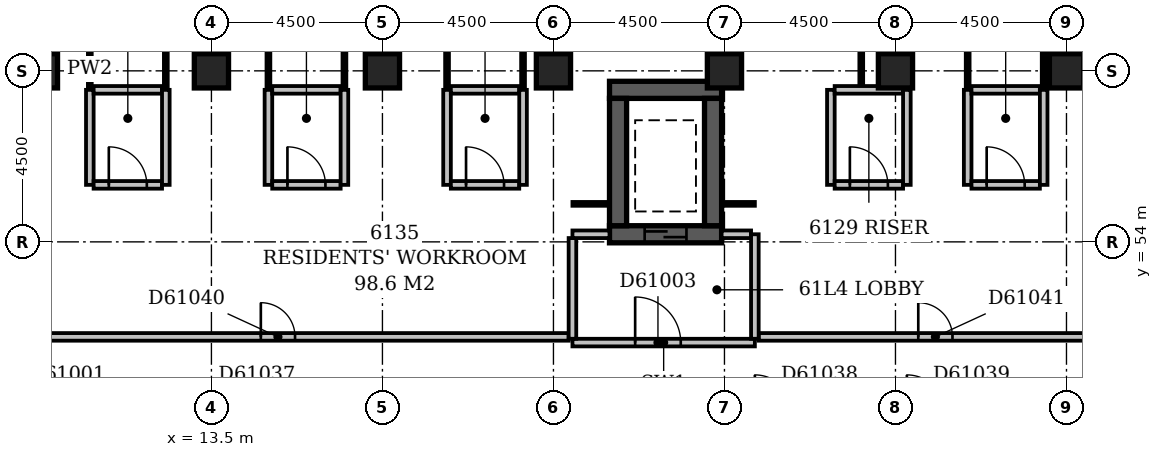
"""IFC4 building model, lengths in metres.
Left out: names, types, materials, properties, quantities, classifications, styles, units other than length and angle.
Written with IfcOpenShell. Run it as: python <this file> out.ifc"""

import sys

from ifc_helpers import new_model, si_unit, direction, frame, frame_2d, origin, origin_2d, place, context, subcontext, project, spatial, rectangle, extrude, element, fill, save


model = new_model("IFC4")
c1 = context("Model", 3, precision=1e-05, world=origin(), true_north=direction((0.0, 1.0)))
c2 = subcontext(c1, "Body", "Model", "MODEL_VIEW")
j1 = project(units=[si_unit("LENGTHUNIT", "METRE"), si_unit("PLANEANGLEUNIT", "RADIAN")], contexts=[c1])
p1 = place(None, origin())
s1 = spatial("IfcSite", under=j1, at=p1, CompositionType="ELEMENT")
p2 = place(p1, origin())
s2 = spatial("IfcBuilding", under=s1, at=p2, CompositionType="ELEMENT")
p3 = place(p2, frame((0.0, 0.0, 236.6)))
s3 = spatial("IfcBuildingStorey", under=s2, at=p3, CompositionType="ELEMENT", Elevation=236.6)
p4 = place(p3, frame((23.975, 54.2, -0.3), z_axis=(0.0, 0.0, 1.0), x_axis=(1.0, 0.0, 0.0)))
e1 = element("IfcWall", 1, at=p4, inside=s3, PredefinedType="SHEAR", context=c2, shape_type="SweptSolid", body=[
    extrude(rectangle(XDim=2.95, YDim=0.45, at=frame_2d((1.475, 0.0))), origin(), (0.0, 0.0, 1.0), 3.6),
])
p5 = place(p4, frame((0.925, 0.0, 0.3)))
e2 = element("IfcOpeningElement", 2, at=p5, cuts=e1, PredefinedType="OPENING", context=c2, shape_type="SweptSolid", body=[
    extrude(rectangle(XDim=1.1, YDim=2.1, at=frame_2d((0.55, 1.05))), frame((0.0, 0.237, 0.0), z_axis=(0.0, -1.0, 0.0), x_axis=(1.0, 0.0, 0.0)), (0.0, 0.0, 1.0), 0.474),
])
p6 = place(p3, frame((23.975, 58.0, -0.3), z_axis=(0.0, 0.0, 1.0), x_axis=(1.0, 0.0, 0.0)))
e3 = element("IfcWall", 3, at=p6, inside=s3, PredefinedType="SHEAR", context=c2, shape_type="SweptSolid", body=[
    extrude(rectangle(XDim=2.95, YDim=0.45, at=frame_2d((1.475, 0.0))), origin(), (0.0, 0.0, 1.0), 3.6),
])
for number, where, z_axis, x_axis in (
    (4, (24.2, 54.425, -0.3), (0.0, 0.0, 1.0), (0.0, 1.0, 0.0)),
    (5, (26.7, 54.425, -0.3), (0.0, 0.0, 1.0), (0.0, 1.0, 0.0)),
):
    element("IfcWall", number, at=place(p3, frame(where, z_axis=z_axis, x_axis=x_axis)), inside=s3, PredefinedType="SHEAR", context=c2, shape_type="SweptSolid", body=[
        extrude(rectangle(XDim=3.35, YDim=0.45, at=frame_2d((1.675, 0.0))), origin(), (0.0, 0.0, 1.0), 3.6),
    ])
for number, where, z_axis, x_axis in (
    (6, (9.0, 58.5, -0.3), (0.0, 0.0, 1.0), (1.0, 0.0, 0.0)),
    (7, (13.5, 58.5, -0.3), (0.0, 0.0, 1.0), (1.0, 0.0, 0.0)),
    (8, (18.0, 58.5, -0.3), (0.0, 0.0, 1.0), (1.0, 0.0, 0.0)),
    (9, (22.5, 58.5, -0.3), (0.0, 0.0, 1.0), (1.0, 0.0, 0.0)),
    (10, (27.0, 58.5, -0.3), (0.0, 0.0, 1.0), (1.0, 0.0, 0.0)),
    (11, (31.5, 58.5, -0.3), (0.0, 0.0, 1.0), (1.0, 0.0, 0.0)),
    (12, (36.0, 58.5, -0.3), (0.0, 0.0, 1.0), (1.0, 0.0, 0.0)),
):
    element("IfcColumn", number, at=place(p3, frame(where, z_axis=z_axis, x_axis=x_axis)), inside=s3, PredefinedType="COLUMN", context=c2, shape_type="SweptSolid", body=[
        extrude(rectangle(XDim=0.9, YDim=0.9, at=origin_2d()), origin(), (0.0, 0.0, 1.0), 3.6),
    ])
p7 = place(p3, frame((23.0, 51.35, 0.0), z_axis=(0.0, 0.0, 1.0), x_axis=(1.0, 0.0, 0.0)))
e13 = element("IfcWall", 13, at=p7, inside=s3, PredefinedType="PARTITIONING", context=c2, shape_type="SweptSolid", body=[
    extrude(rectangle(XDim=4.8, YDim=0.2, at=frame_2d((2.4, 0.0))), origin(), (0.0, 0.0, 1.0), 3.3),
])
p8 = place(p7, frame((1.65, 0.0, 0.0)))
e14 = element("IfcOpeningElement", 14, at=p8, cuts=e13, PredefinedType="OPENING", context=c2, shape_type="SweptSolid", body=[
    extrude(rectangle(XDim=1.2, YDim=2.1, at=frame_2d((0.6, 1.05))), frame((0.0, 0.112, 0.0), z_axis=(0.0, -1.0, 0.0), x_axis=(1.0, 0.0, 0.0)), (0.0, 0.0, 1.0), 0.224),
])
p9 = place(p3, frame((27.8, 51.45, 0.0), z_axis=(0.0, 0.0, 1.0), x_axis=(0.0, 1.0, 0.0)))
e15 = element("IfcWall", 15, at=p9, inside=s3, PredefinedType="PARTITIONING", context=c2, shape_type="SweptSolid", body=[
    extrude(rectangle(XDim=2.75, YDim=0.2, at=frame_2d((1.375, 0.0))), origin(), (0.0, 0.0, 1.0), 3.3),
])
p10 = place(p3, frame((23.0, 54.2, 0.0), z_axis=(0.0, 0.0, 1.0), x_axis=(1.0, 0.0, 0.0)))
e16 = element("IfcWall", 16, at=p10, inside=s3, PredefinedType="PARTITIONING", context=c2, shape_type="SweptSolid", body=[
    extrude(rectangle(XDim=0.975, YDim=0.2, at=frame_2d((0.488, 0.0))), origin(), (0.0, 0.0, 1.0), 3.3),
])
p11 = place(p3, frame((26.925, 54.2, 0.0), z_axis=(0.0, 0.0, 1.0), x_axis=(1.0, 0.0, 0.0)))
e17 = element("IfcWall", 17, at=p11, inside=s3, PredefinedType="PARTITIONING", context=c2, shape_type="SweptSolid", body=[
    extrude(rectangle(XDim=0.775, YDim=0.2, at=frame_2d((0.387, 0.0))), origin(), (0.0, 0.0, 1.0), 3.3),
])
p12 = place(p3, frame((23.0, 51.45, 0.0), z_axis=(0.0, 0.0, 1.0), x_axis=(0.0, 1.0, 0.0)))
e18 = element("IfcWall", 18, at=p12, inside=s3, PredefinedType="PARTITIONING", context=c2, shape_type="SweptSolid", body=[
    extrude(rectangle(XDim=2.65, YDim=0.2, at=frame_2d((1.325, 0.0))), origin(), (0.0, 0.0, 1.0), 3.3),
])
p13 = place(p3, frame((7.6, 51.5, 0.0), z_axis=(0.0, 0.0, 1.0), x_axis=(1.0, 0.0, 0.0)))
e19 = element("IfcWall", 19, at=p13, inside=s3, PredefinedType="PARTITIONING", context=c2, shape_type="SweptSolid", body=[
    extrude(rectangle(XDim=15.3, YDim=0.2, at=frame_2d((7.65, 0.0))), origin(), (0.0, 0.0, 1.0), 3.3),
])
p14 = place(p13, frame((7.2, 0.0, 0.0)))
e20 = element("IfcOpeningElement", 20, at=p14, cuts=e19, PredefinedType="OPENING", context=c2, shape_type="SweptSolid", body=[
    extrude(rectangle(XDim=0.9, YDim=2.1, at=frame_2d((0.45, 1.05))), frame((0.0, 0.112, 0.0), z_axis=(0.0, -1.0, 0.0), x_axis=(1.0, 0.0, 0.0)), (0.0, 0.0, 1.0), 0.224),
])
p15 = place(p3, frame((27.9, 51.5, 0.0), z_axis=(0.0, 0.0, 1.0), x_axis=(1.0, 0.0, 0.0)))
e21 = element("IfcWall", 21, at=p15, inside=s3, PredefinedType="PARTITIONING", context=c2, shape_type="SweptSolid", body=[
    extrude(rectangle(XDim=9.3, YDim=0.2, at=frame_2d((4.65, 0.0))), origin(), (0.0, 0.0, 1.0), 3.3),
])
p16 = place(p15, frame((4.2, 0.0, 0.0)))
e22 = element("IfcOpeningElement", 22, at=p16, cuts=e21, PredefinedType="OPENING", context=c2, shape_type="SweptSolid", body=[
    extrude(rectangle(XDim=0.9, YDim=2.1, at=frame_2d((0.45, 1.05))), frame((0.0, 0.112, 0.0), z_axis=(0.0, -1.0, 0.0), x_axis=(1.0, 0.0, 0.0)), (0.0, 0.0, 1.0), 0.224),
])
p17 = place(p3, frame((23.0, 55.0, 0.0), z_axis=(0.0, 0.0, 1.0), x_axis=(1.0, 0.0, 0.0)))
e23 = element("IfcWall", 23, at=p17, inside=s3, PredefinedType="PARTITIONING", context=c2, shape_type="SweptSolid", body=[
    extrude(rectangle(XDim=0.975, YDim=0.1, at=frame_2d((0.488, 0.0))), origin(), (0.0, 0.0, 1.0), 3.3),
])
p18 = place(p3, frame((26.925, 55.0, 0.0), z_axis=(0.0, 0.0, 1.0), x_axis=(1.0, 0.0, 0.0)))
e24 = element("IfcWall", 24, at=p18, inside=s3, PredefinedType="PARTITIONING", context=c2, shape_type="SweptSolid", body=[
    extrude(rectangle(XDim=0.875, YDim=0.1, at=frame_2d((0.438, 0.0))), origin(), (0.0, 0.0, 1.0), 3.3),
])
p19 = place(p3, frame((10.3, 55.5, 0.0), z_axis=(0.0, 0.0, 1.0), x_axis=(0.0, 1.0, 0.0)))
e25 = element("IfcWall", 25, at=p19, inside=s3, PredefinedType="PARTITIONING", context=c2, shape_type="SweptSolid", body=[
    extrude(rectangle(XDim=2.5, YDim=0.2, at=frame_2d((1.25, 0.0))), origin(), (0.0, 0.0, 1.0), 3.3),
])
p20 = place(p3, frame((10.4, 55.5, 0.0), z_axis=(0.0, 0.0, 1.0), x_axis=(1.0, 0.0, 0.0)))
e26 = element("IfcWall", 26, at=p20, inside=s3, PredefinedType="PARTITIONING", context=c2, shape_type="SweptSolid", body=[
    extrude(rectangle(XDim=1.8, YDim=0.2, at=frame_2d((0.9, 0.0))), origin(), (0.0, 0.0, 1.0), 3.3),
])
p21 = place(p20, frame((0.4, 0.0, 0.0)))
e27 = element("IfcOpeningElement", 27, at=p21, cuts=e26, PredefinedType="OPENING", context=c2, shape_type="SweptSolid", body=[
    extrude(rectangle(XDim=1.0, YDim=2.1, at=frame_2d((0.5, 1.05))), frame((0.0, 0.112, 0.0), z_axis=(0.0, -1.0, 0.0), x_axis=(1.0, 0.0, 0.0)), (0.0, 0.0, 1.0), 0.224),
])
for number, where, z_axis, x_axis in (
    (28, (12.3, 55.5, 0.0), (0.0, 0.0, 1.0), (0.0, 1.0, 0.0)),
    (29, (15.0, 55.5, 0.0), (0.0, 0.0, 1.0), (0.0, 1.0, 0.0)),
):
    element("IfcWall", number, at=place(p3, frame(where, z_axis=z_axis, x_axis=x_axis)), inside=s3, PredefinedType="PARTITIONING", context=c2, shape_type="SweptSolid", body=[
        extrude(rectangle(XDim=2.5, YDim=0.2, at=frame_2d((1.25, 0.0))), origin(), (0.0, 0.0, 1.0), 3.3),
    ])
p22 = place(p3, frame((15.1, 55.5, 0.0), z_axis=(0.0, 0.0, 1.0), x_axis=(1.0, 0.0, 0.0)))
e30 = element("IfcWall", 30, at=p22, inside=s3, PredefinedType="PARTITIONING", context=c2, shape_type="SweptSolid", body=[
    extrude(rectangle(XDim=1.8, YDim=0.2, at=frame_2d((0.9, 0.0))), origin(), (0.0, 0.0, 1.0), 3.3),
])
p23 = place(p22, frame((0.4, 0.0, 0.0)))
e31 = element("IfcOpeningElement", 31, at=p23, cuts=e30, PredefinedType="OPENING", context=c2, shape_type="SweptSolid", body=[
    extrude(rectangle(XDim=1.0, YDim=2.1, at=frame_2d((0.5, 1.05))), frame((0.0, 0.112, 0.0), z_axis=(0.0, -1.0, 0.0), x_axis=(1.0, 0.0, 0.0)), (0.0, 0.0, 1.0), 0.224),
])
for number, where, z_axis, x_axis in (
    (32, (17.0, 55.5, 0.0), (0.0, 0.0, 1.0), (0.0, 1.0, 0.0)),
    (33, (19.7, 55.5, 0.0), (0.0, 0.0, 1.0), (0.0, 1.0, 0.0)),
):
    element("IfcWall", number, at=place(p3, frame(where, z_axis=z_axis, x_axis=x_axis)), inside=s3, PredefinedType="PARTITIONING", context=c2, shape_type="SweptSolid", body=[
        extrude(rectangle(XDim=2.5, YDim=0.2, at=frame_2d((1.25, 0.0))), origin(), (0.0, 0.0, 1.0), 3.3),
    ])
p24 = place(p3, frame((19.8, 55.5, 0.0), z_axis=(0.0, 0.0, 1.0), x_axis=(1.0, 0.0, 0.0)))
e34 = element("IfcWall", 34, at=p24, inside=s3, PredefinedType="PARTITIONING", context=c2, shape_type="SweptSolid", body=[
    extrude(rectangle(XDim=1.8, YDim=0.2, at=frame_2d((0.9, 0.0))), origin(), (0.0, 0.0, 1.0), 3.3),
])
p25 = place(p24, frame((0.4, 0.0, 0.0)))
e35 = element("IfcOpeningElement", 35, at=p25, cuts=e34, PredefinedType="OPENING", context=c2, shape_type="SweptSolid", body=[
    extrude(rectangle(XDim=1.0, YDim=2.1, at=frame_2d((0.5, 1.05))), frame((0.0, 0.112, 0.0), z_axis=(0.0, -1.0, 0.0), x_axis=(1.0, 0.0, 0.0)), (0.0, 0.0, 1.0), 0.224),
])
for number, where, z_axis, x_axis in (
    (36, (21.7, 55.5, 0.0), (0.0, 0.0, 1.0), (0.0, 1.0, 0.0)),
    (37, (29.8, 55.5, 0.0), (0.0, 0.0, 1.0), (0.0, 1.0, 0.0)),
):
    element("IfcWall", number, at=place(p3, frame(where, z_axis=z_axis, x_axis=x_axis)), inside=s3, PredefinedType="PARTITIONING", context=c2, shape_type="SweptSolid", body=[
        extrude(rectangle(XDim=2.5, YDim=0.2, at=frame_2d((1.25, 0.0))), origin(), (0.0, 0.0, 1.0), 3.3),
    ])
p26 = place(p3, frame((29.9, 55.5, 0.0), z_axis=(0.0, 0.0, 1.0), x_axis=(1.0, 0.0, 0.0)))
e38 = element("IfcWall", 38, at=p26, inside=s3, PredefinedType="PARTITIONING", context=c2, shape_type="SweptSolid", body=[
    extrude(rectangle(XDim=1.8, YDim=0.2, at=frame_2d((0.9, 0.0))), origin(), (0.0, 0.0, 1.0), 3.3),
])
p27 = place(p26, frame((0.4, 0.0, 0.0)))
e39 = element("IfcOpeningElement", 39, at=p27, cuts=e38, PredefinedType="OPENING", context=c2, shape_type="SweptSolid", body=[
    extrude(rectangle(XDim=1.0, YDim=2.1, at=frame_2d((0.5, 1.05))), frame((0.0, 0.112, 0.0), z_axis=(0.0, -1.0, 0.0), x_axis=(1.0, 0.0, 0.0)), (0.0, 0.0, 1.0), 0.224),
])
for number, where, z_axis, x_axis in (
    (40, (31.8, 55.5, 0.0), (0.0, 0.0, 1.0), (0.0, 1.0, 0.0)),
    (41, (33.4, 55.5, 0.0), (0.0, 0.0, 1.0), (0.0, 1.0, 0.0)),
):
    element("IfcWall", number, at=place(p3, frame(where, z_axis=z_axis, x_axis=x_axis)), inside=s3, PredefinedType="PARTITIONING", context=c2, shape_type="SweptSolid", body=[
        extrude(rectangle(XDim=2.5, YDim=0.2, at=frame_2d((1.25, 0.0))), origin(), (0.0, 0.0, 1.0), 3.3),
    ])
p28 = place(p3, frame((33.5, 55.5, 0.0), z_axis=(0.0, 0.0, 1.0), x_axis=(1.0, 0.0, 0.0)))
e42 = element("IfcWall", 42, at=p28, inside=s3, PredefinedType="PARTITIONING", context=c2, shape_type="SweptSolid", body=[
    extrude(rectangle(XDim=1.8, YDim=0.2, at=frame_2d((0.9, 0.0))), origin(), (0.0, 0.0, 1.0), 3.3),
])
p29 = place(p28, frame((0.4, 0.0, 0.0)))
e43 = element("IfcOpeningElement", 43, at=p29, cuts=e42, PredefinedType="OPENING", context=c2, shape_type="SweptSolid", body=[
    extrude(rectangle(XDim=1.0, YDim=2.1, at=frame_2d((0.5, 1.05))), frame((0.0, 0.112, 0.0), z_axis=(0.0, -1.0, 0.0), x_axis=(1.0, 0.0, 0.0)), (0.0, 0.0, 1.0), 0.224),
])
p30 = place(p3, frame((35.4, 55.5, 0.0), z_axis=(0.0, 0.0, 1.0), x_axis=(0.0, 1.0, 0.0)))
e44 = element("IfcWall", 44, at=p30, inside=s3, PredefinedType="PARTITIONING", context=c2, shape_type="SweptSolid", body=[
    extrude(rectangle(XDim=2.5, YDim=0.2, at=frame_2d((1.25, 0.0))), origin(), (0.0, 0.0, 1.0), 3.3),
])
p31 = place(p3, frame((10.3, 58.0, 0.0), z_axis=(0.0, 0.0, 1.0), x_axis=(0.0, 1.0, 0.0)))
e45 = element("IfcWall", 45, at=p31, inside=s3, PredefinedType="PARTITIONING", context=c2, shape_type="SweptSolid", body=[
    extrude(rectangle(XDim=1.1, YDim=0.1, at=frame_2d((0.55, 0.0))), origin(), (0.0, 0.0, 1.0), 3.3),
])
p32 = place(p3, frame((10.4, 58.0, 0.0), z_axis=(0.0, 0.0, 1.0), x_axis=(1.0, 0.0, 0.0)))
e46 = element("IfcWall", 46, at=p32, inside=s3, PredefinedType="PARTITIONING", context=c2, shape_type="SweptSolid", body=[
    extrude(rectangle(XDim=1.8, YDim=0.2, at=frame_2d((0.9, 0.0))), origin(), (0.0, 0.0, 1.0), 3.3),
])
for number, where, z_axis, x_axis in (
    (47, (12.3, 58.0, 0.0), (0.0, 0.0, 1.0), (0.0, 1.0, 0.0)),
    (48, (15.0, 58.0, 0.0), (0.0, 0.0, 1.0), (0.0, 1.0, 0.0)),
):
    element("IfcWall", number, at=place(p3, frame(where, z_axis=z_axis, x_axis=x_axis)), inside=s3, PredefinedType="PARTITIONING", context=c2, shape_type="SweptSolid", body=[
        extrude(rectangle(XDim=1.1, YDim=0.1, at=frame_2d((0.55, 0.0))), origin(), (0.0, 0.0, 1.0), 3.3),
    ])
p33 = place(p3, frame((15.1, 58.0, 0.0), z_axis=(0.0, 0.0, 1.0), x_axis=(1.0, 0.0, 0.0)))
e49 = element("IfcWall", 49, at=p33, inside=s3, PredefinedType="PARTITIONING", context=c2, shape_type="SweptSolid", body=[
    extrude(rectangle(XDim=1.8, YDim=0.2, at=frame_2d((0.9, 0.0))), origin(), (0.0, 0.0, 1.0), 3.3),
])
for number, where, z_axis, x_axis in (
    (50, (17.0, 58.0, 0.0), (0.0, 0.0, 1.0), (0.0, 1.0, 0.0)),
    (51, (19.7, 58.0, 0.0), (0.0, 0.0, 1.0), (0.0, 1.0, 0.0)),
):
    element("IfcWall", number, at=place(p3, frame(where, z_axis=z_axis, x_axis=x_axis)), inside=s3, PredefinedType="PARTITIONING", context=c2, shape_type="SweptSolid", body=[
        extrude(rectangle(XDim=1.1, YDim=0.1, at=frame_2d((0.55, 0.0))), origin(), (0.0, 0.0, 1.0), 3.3),
    ])
p34 = place(p3, frame((19.8, 58.0, 0.0), z_axis=(0.0, 0.0, 1.0), x_axis=(1.0, 0.0, 0.0)))
e52 = element("IfcWall", 52, at=p34, inside=s3, PredefinedType="PARTITIONING", context=c2, shape_type="SweptSolid", body=[
    extrude(rectangle(XDim=1.8, YDim=0.2, at=frame_2d((0.9, 0.0))), origin(), (0.0, 0.0, 1.0), 3.3),
])
p35 = place(p3, frame((21.7, 58.0, 0.0), z_axis=(0.0, 0.0, 1.0), x_axis=(0.0, 1.0, 0.0)))
e53 = element("IfcWall", 53, at=p35, inside=s3, PredefinedType="PARTITIONING", context=c2, shape_type="SweptSolid", body=[
    extrude(rectangle(XDim=1.1, YDim=0.1, at=frame_2d((0.55, 0.0))), origin(), (0.0, 0.0, 1.0), 3.3),
])
p36 = place(p3, frame((29.9, 58.0, 0.0), z_axis=(0.0, 0.0, 1.0), x_axis=(1.0, 0.0, 0.0)))
e54 = element("IfcWall", 54, at=p36, inside=s3, PredefinedType="PARTITIONING", context=c2, shape_type="SweptSolid", body=[
    extrude(rectangle(XDim=1.8, YDim=0.2, at=frame_2d((0.9, 0.0))), origin(), (0.0, 0.0, 1.0), 3.3),
])
p37 = place(p3, frame((33.4, 58.0, 0.0), z_axis=(0.0, 0.0, 1.0), x_axis=(0.0, 1.0, 0.0)))
e55 = element("IfcWall", 55, at=p37, inside=s3, PredefinedType="PARTITIONING", context=c2, shape_type="SweptSolid", body=[
    extrude(rectangle(XDim=1.1, YDim=0.1, at=frame_2d((0.55, 0.0))), origin(), (0.0, 0.0, 1.0), 3.3),
])
p38 = place(p3, frame((33.5, 58.0, 0.0), z_axis=(0.0, 0.0, 1.0), x_axis=(1.0, 0.0, 0.0)))
e56 = element("IfcWall", 56, at=p38, inside=s3, PredefinedType="PARTITIONING", context=c2, shape_type="SweptSolid", body=[
    extrude(rectangle(XDim=1.8, YDim=0.2, at=frame_2d((0.9, 0.0))), origin(), (0.0, 0.0, 1.0), 3.3),
])
p39 = place(p3, frame((35.4, 58.0, 0.0), z_axis=(0.0, 0.0, 1.0), x_axis=(0.0, 1.0, 0.0)))
e57 = element("IfcWall", 57, at=p39, inside=s3, PredefinedType="PARTITIONING", context=c2, shape_type="SweptSolid", body=[
    extrude(rectangle(XDim=1.1, YDim=0.1, at=frame_2d((0.55, 0.0))), origin(), (0.0, 0.0, 1.0), 3.3),
])
p40 = place(p3, frame((30.6, 58.1, 0.0), z_axis=(0.0, 0.0, 1.0), x_axis=(0.0, 1.0, 0.0)))
e58 = element("IfcWall", 58, at=p40, inside=s3, PredefinedType="PARTITIONING", context=c2, shape_type="SweptSolid", body=[
    extrude(rectangle(XDim=1.0, YDim=0.1, at=frame_2d((0.5, 0.0))), origin(), (0.0, 0.0, 1.0), 3.3),
])
p41 = place(p8, origin())
e59 = element("IfcDoor", 59, at=p41, inside=s3, OperationType="SINGLE_SWING_LEFT", PredefinedType="DOOR", context=c2, shape_type="SweptSolid", body=[
    extrude(rectangle(XDim=1.2, YDim=2.1, at=frame_2d((0.6, 1.05))), frame((0.0, 0.025, 0.0), z_axis=(0.0, -1.0, 0.0), x_axis=(1.0, 0.0, 0.0)), (0.0, 0.0, 1.0), 0.05),
])
fill(e14, e59)
p42 = place(p5, origin())
e60 = element("IfcDoor", 60, at=p42, inside=s3, OperationType="SLIDING_TO_LEFT", PredefinedType="DOOR", context=c2, shape_type="SweptSolid", body=[
    extrude(rectangle(XDim=1.1, YDim=2.1, at=frame_2d((0.55, 1.05))), frame((0.0, 0.025, 0.0), z_axis=(0.0, -1.0, 0.0), x_axis=(1.0, 0.0, 0.0)), (0.0, 0.0, 1.0), 0.05),
])
fill(e2, e60)
p43 = place(p14, origin())
e61 = element("IfcDoor", 61, at=p43, inside=s3, OperationType="SINGLE_SWING_LEFT", PredefinedType="DOOR", context=c2, shape_type="SweptSolid", body=[
    extrude(rectangle(XDim=0.9, YDim=2.1, at=frame_2d((0.45, 1.05))), frame((0.0, 0.025, 0.0), z_axis=(0.0, -1.0, 0.0), x_axis=(1.0, 0.0, 0.0)), (0.0, 0.0, 1.0), 0.05),
])
fill(e20, e61)
p44 = place(p16, origin())
e62 = element("IfcDoor", 62, at=p44, inside=s3, OperationType="SINGLE_SWING_LEFT", PredefinedType="DOOR", context=c2, shape_type="SweptSolid", body=[
    extrude(rectangle(XDim=0.9, YDim=2.1, at=frame_2d((0.45, 1.05))), frame((0.0, 0.025, 0.0), z_axis=(0.0, -1.0, 0.0), x_axis=(1.0, 0.0, 0.0)), (0.0, 0.0, 1.0), 0.05),
])
fill(e22, e62)
p45 = place(p21, origin())
e63 = element("IfcDoor", 63, at=p45, inside=s3, OperationType="SINGLE_SWING_LEFT", PredefinedType="DOOR", context=c2, shape_type="SweptSolid", body=[
    extrude(rectangle(XDim=1.0, YDim=2.1, at=frame_2d((0.5, 1.05))), frame((0.0, 0.025, 0.0), z_axis=(0.0, -1.0, 0.0), x_axis=(1.0, 0.0, 0.0)), (0.0, 0.0, 1.0), 0.05),
])
fill(e27, e63)
p46 = place(p23, origin())
e64 = element("IfcDoor", 64, at=p46, inside=s3, OperationType="SINGLE_SWING_LEFT", PredefinedType="DOOR", context=c2, shape_type="SweptSolid", body=[
    extrude(rectangle(XDim=1.0, YDim=2.1, at=frame_2d((0.5, 1.05))), frame((0.0, 0.025, 0.0), z_axis=(0.0, -1.0, 0.0), x_axis=(1.0, 0.0, 0.0)), (0.0, 0.0, 1.0), 0.05),
])
fill(e31, e64)
p47 = place(p25, origin())
e65 = element("IfcDoor", 65, at=p47, inside=s3, OperationType="SINGLE_SWING_LEFT", PredefinedType="DOOR", context=c2, shape_type="SweptSolid", body=[
    extrude(rectangle(XDim=1.0, YDim=2.1, at=frame_2d((0.5, 1.05))), frame((0.0, 0.025, 0.0), z_axis=(0.0, -1.0, 0.0), x_axis=(1.0, 0.0, 0.0)), (0.0, 0.0, 1.0), 0.05),
])
fill(e35, e65)
p48 = place(p27, origin())
e66 = element("IfcDoor", 66, at=p48, inside=s3, OperationType="SINGLE_SWING_LEFT", PredefinedType="DOOR", context=c2, shape_type="SweptSolid", body=[
    extrude(rectangle(XDim=1.0, YDim=2.1, at=frame_2d((0.5, 1.05))), frame((0.0, 0.025, 0.0), z_axis=(0.0, -1.0, 0.0), x_axis=(1.0, 0.0, 0.0)), (0.0, 0.0, 1.0), 0.05),
])
fill(e39, e66)
p49 = place(p29, origin())
e67 = element("IfcDoor", 67, at=p49, inside=s3, OperationType="SINGLE_SWING_LEFT", PredefinedType="DOOR", context=c2, shape_type="SweptSolid", body=[
    extrude(rectangle(XDim=1.0, YDim=2.1, at=frame_2d((0.5, 1.05))), frame((0.0, 0.025, 0.0), z_axis=(0.0, -1.0, 0.0), x_axis=(1.0, 0.0, 0.0)), (0.0, 0.0, 1.0), 0.05),
])
fill(e43, e67)
save(model, sys.argv[1])
